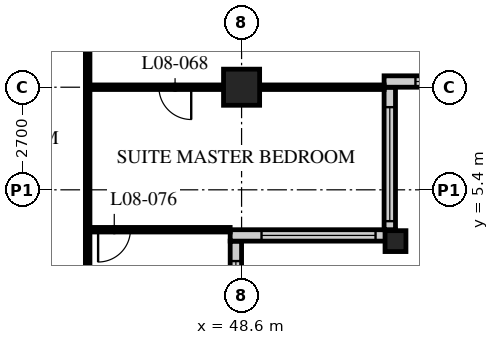
"""IFC4 building model, lengths in metres.
Left out: names, types, materials, properties, quantities, classifications, styles, units other than length and angle.
Written with IfcOpenShell. Run it as: python <this file> out.ifc"""

import sys

from ifc_helpers import new_model, si_unit, direction, frame, frame_2d, origin, origin_2d, place, context, subcontext, project, spatial, rectangle, hollow_rectangle, extrude, element, fill, save


model = new_model("IFC4")
c1 = context("Model", 3, precision=1e-05, world=origin(), true_north=direction((0.0, 1.0)))
c2 = subcontext(c1, "Body", "Model", "MODEL_VIEW")
j1 = project(units=[si_unit("LENGTHUNIT", "METRE"), si_unit("PLANEANGLEUNIT", "RADIAN")], contexts=[c1])
p1 = place(None, origin())
s1 = spatial("IfcSite", under=j1, at=p1, CompositionType="ELEMENT")
p2 = place(p1, origin())
s2 = spatial("IfcBuilding", under=s1, at=p2, CompositionType="ELEMENT")
p3 = place(p2, frame((0.0, 0.0, 39.8)))
s3 = spatial("IfcBuildingStorey", under=s2, at=p3, CompositionType="ELEMENT", Elevation=39.8)
p4 = place(p3, frame((48.6, 8.1, 0.0), z_axis=(0.0, 0.0, 1.0), x_axis=(1.0, 0.0, 0.0)))
e1 = element("IfcColumn", 1, at=p4, inside=s3, PredefinedType="COLUMN", context=c2, shape_type="SweptSolid", body=[
    extrude(hollow_rectangle(XDim=0.95, YDim=0.95, WallThickness=0.095, at=origin_2d()), origin(), (0.0, 0.0, 1.0), 3.4),
])
p5 = place(p3, frame((52.65, 4.05, 0.0), z_axis=(0.0, 0.0, 1.0), x_axis=(1.0, 0.0, 0.0)))
e2 = element("IfcColumn", 2, at=p5, inside=s3, PredefinedType="COLUMN", context=c2, shape_type="SweptSolid", body=[
    extrude(hollow_rectangle(XDim=0.55, YDim=0.55, WallThickness=0.05, at=origin_2d()), origin(), (0.0, 0.0, 1.0), 3.4),
])
p6 = place(p3, frame((48.45, 0.3, 0.0), z_axis=(0.0, 0.0, 1.0), x_axis=(0.0, 1.0, 0.0)))
e3 = element("IfcWall", 3, at=p6, inside=s3, PredefinedType="SOLIDWALL", context=c2, shape_type="SweptSolid", body=[
    extrude(rectangle(XDim=3.75, YDim=0.3, at=frame_2d((1.875, 0.0))), origin(), (0.0, 0.0, 1.0), 3.19),
])
p7 = place(p6, frame((0.225, 0.0, 0.9)))
e4 = element("IfcOpeningElement", 4, at=p7, cuts=e3, PredefinedType="OPENING", context=c2, shape_type="SweptSolid", body=[
    extrude(rectangle(XDim=3.0, YDim=1.5, at=frame_2d((1.5, 0.75))), frame((0.0, 0.16, 0.0), z_axis=(0.0, -1.0, 0.0), x_axis=(1.0, 0.0, 0.0)), (0.0, 0.0, 1.0), 0.32),
])
p8 = place(p3, frame((48.3, 4.2, 0.0), z_axis=(0.0, 0.0, 1.0), x_axis=(1.0, 0.0, 0.0)))
e5 = element("IfcWall", 5, at=p8, inside=s3, PredefinedType="SOLIDWALL", context=c2, shape_type="SweptSolid", body=[
    extrude(rectangle(XDim=4.35, YDim=0.3, at=frame_2d((2.175, 0.0))), origin(), (0.0, 0.0, 1.0), 3.19),
])
p9 = place(p8, frame((0.825, 0.0, 0.9)))
e6 = element("IfcOpeningElement", 6, at=p9, cuts=e5, PredefinedType="OPENING", context=c2, shape_type="SweptSolid", body=[
    extrude(rectangle(XDim=3.0, YDim=1.5, at=frame_2d((1.5, 0.75))), frame((0.0, 0.16, 0.0), z_axis=(0.0, -1.0, 0.0), x_axis=(1.0, 0.0, 0.0)), (0.0, 0.0, 1.0), 0.32),
])
p10 = place(p3, frame((52.5, 4.35, 0.0), z_axis=(0.0, 0.0, 1.0), x_axis=(0.0, 1.0, 0.0)))
e7 = element("IfcWall", 7, at=p10, inside=s3, PredefinedType="SOLIDWALL", context=c2, shape_type="SweptSolid", body=[
    extrude(rectangle(XDim=3.75, YDim=0.3, at=frame_2d((1.875, 0.0))), origin(), (0.0, 0.0, 1.0), 3.19),
])
p11 = place(p10, frame((0.225, 0.0, 0.9)))
e8 = element("IfcOpeningElement", 8, at=p11, cuts=e7, PredefinedType="OPENING", context=c2, shape_type="SweptSolid", body=[
    extrude(rectangle(XDim=3.0, YDim=1.5, at=frame_2d((1.5, 0.75))), frame((0.0, 0.16, 0.0), z_axis=(0.0, -1.0, 0.0), x_axis=(1.0, 0.0, 0.0)), (0.0, 0.0, 1.0), 0.32),
])
p12 = place(p3, frame((52.35, 8.25, 0.0), z_axis=(0.0, 0.0, 1.0), x_axis=(1.0, 0.0, 0.0)))
e9 = element("IfcWall", 9, at=p12, inside=s3, PredefinedType="SOLIDWALL", context=c2, shape_type="SweptSolid", body=[
    extrude(rectangle(XDim=4.35, YDim=0.3, at=frame_2d((2.175, 0.0))), origin(), (0.0, 0.0, 1.0), 3.19),
])
p13 = place(p12, frame((0.825, 0.0, 0.9)))
e10 = element("IfcOpeningElement", 10, at=p13, cuts=e9, PredefinedType="OPENING", context=c2, shape_type="SweptSolid", body=[
    extrude(rectangle(XDim=3.0, YDim=1.5, at=frame_2d((1.5, 0.75))), frame((0.0, 0.16, 0.0), z_axis=(0.0, -1.0, 0.0), x_axis=(1.0, 0.0, 0.0)), (0.0, 0.0, 1.0), 0.32),
])
p14 = place(p3, frame((44.55, 13.8, 0.0), z_axis=(0.0, 0.0, 1.0), x_axis=(0.0, -1.0, 0.0)))
e11 = element("IfcWall", 11, at=p14, inside=s3, PredefinedType="PARTITIONING", context=c2, shape_type="SweptSolid", body=[
    extrude(rectangle(XDim=13.5, YDim=0.12, at=frame_2d((6.75, 0.0))), origin(), (0.0, 0.0, 1.0), 3.19),
])
p15 = place(p3, frame((44.55, 8.1, 0.0), z_axis=(0.0, 0.0, 1.0), x_axis=(1.0, 0.0, 0.0)))
e12 = element("IfcWall", 12, at=p15, inside=s3, PredefinedType="PARTITIONING", context=c2, shape_type="SweptSolid", body=[
    extrude(rectangle(XDim=7.8, YDim=0.12, at=frame_2d((3.9, 0.0))), origin(), (0.0, 0.0, 1.0), 2.578),
])
p16 = place(p15, frame((1.875, 0.0, 0.0)))
e13 = element("IfcOpeningElement", 13, at=p16, cuts=e12, PredefinedType="OPENING", context=c2, shape_type="SweptSolid", body=[
    extrude(rectangle(XDim=0.85, YDim=2.1, at=frame_2d((0.425, 1.05))), frame((0.0, 0.07, 0.0), z_axis=(0.0, -1.0, 0.0), x_axis=(1.0, 0.0, 0.0)), (0.0, 0.0, 1.0), 0.14),
])
p17 = place(p3, frame((44.55, 4.35, 0.0), z_axis=(0.0, 0.0, 1.0), x_axis=(1.0, 0.0, 0.0)))
e14 = element("IfcWall", 14, at=p17, inside=s3, PredefinedType="PARTITIONING", context=c2, shape_type="SweptSolid", body=[
    extrude(rectangle(XDim=3.75, YDim=0.12, at=frame_2d((1.875, 0.0))), origin(), (0.0, 0.0, 1.0), 3.19),
])
p18 = place(p17, frame((0.275, 0.0, 0.0)))
e15 = element("IfcOpeningElement", 15, at=p18, cuts=e14, PredefinedType="OPENING", context=c2, shape_type="SweptSolid", body=[
    extrude(rectangle(XDim=0.85, YDim=2.1, at=frame_2d((0.425, 1.05))), frame((0.0, 0.07, 0.0), z_axis=(0.0, -1.0, 0.0), x_axis=(1.0, 0.0, 0.0)), (0.0, 0.0, 1.0), 0.14),
])
p19 = place(p7, origin())
e16 = element("IfcWindow", 16, at=p19, inside=s3, PartitioningType="SINGLE_PANEL", PredefinedType="WINDOW", context=c2, shape_type="SweptSolid", body=[
    extrude(rectangle(XDim=3.0, YDim=1.5, at=frame_2d((1.5, 0.75))), frame((0.0, 0.03, 0.0), z_axis=(0.0, -1.0, 0.0), x_axis=(1.0, 0.0, 0.0)), (0.0, 0.0, 1.0), 0.06),
])
fill(e4, e16)
p20 = place(p9, origin())
e17 = element("IfcWindow", 17, at=p20, inside=s3, PartitioningType="SINGLE_PANEL", PredefinedType="WINDOW", context=c2, shape_type="SweptSolid", body=[
    extrude(rectangle(XDim=3.0, YDim=1.5, at=frame_2d((1.5, 0.75))), frame((0.0, 0.03, 0.0), z_axis=(0.0, -1.0, 0.0), x_axis=(1.0, 0.0, 0.0)), (0.0, 0.0, 1.0), 0.06),
])
fill(e6, e17)
p21 = place(p11, origin())
e18 = element("IfcWindow", 18, at=p21, inside=s3, PartitioningType="SINGLE_PANEL", PredefinedType="WINDOW", context=c2, shape_type="SweptSolid", body=[
    extrude(rectangle(XDim=3.0, YDim=1.5, at=frame_2d((1.5, 0.75))), frame((0.0, 0.03, 0.0), z_axis=(0.0, -1.0, 0.0), x_axis=(1.0, 0.0, 0.0)), (0.0, 0.0, 1.0), 0.06),
])
fill(e8, e18)
p22 = place(p13, origin())
e19 = element("IfcWindow", 19, at=p22, inside=s3, PartitioningType="SINGLE_PANEL", PredefinedType="WINDOW", context=c2, shape_type="SweptSolid", body=[
    extrude(rectangle(XDim=3.0, YDim=1.5, at=frame_2d((1.5, 0.75))), frame((0.0, 0.03, 0.0), z_axis=(0.0, -1.0, 0.0), x_axis=(1.0, 0.0, 0.0)), (0.0, 0.0, 1.0), 0.06),
])
fill(e10, e19)
p23 = place(p16, origin())
e20 = element("IfcDoor", 20, at=p23, inside=s3, OperationType="SINGLE_SWING_LEFT", PredefinedType="DOOR", context=c2, shape_type="SweptSolid", body=[
    extrude(rectangle(XDim=0.85, YDim=2.1, at=frame_2d((0.425, 1.05))), frame((0.0, 0.025, 0.0), z_axis=(0.0, -1.0, 0.0), x_axis=(1.0, 0.0, 0.0)), (0.0, 0.0, 1.0), 0.05),
])
fill(e13, e20)
p24 = place(p18, origin())
e21 = element("IfcDoor", 21, at=p24, inside=s3, OperationType="SINGLE_SWING_RIGHT", PredefinedType="DOOR", context=c2, shape_type="SweptSolid", body=[
    extrude(rectangle(XDim=0.85, YDim=2.1, at=frame_2d((0.425, 1.05))), frame((0.0, 0.025, 0.0), z_axis=(0.0, -1.0, 0.0), x_axis=(1.0, 0.0, 0.0)), (0.0, 0.0, 1.0), 0.05),
])
fill(e15, e21)
save(model, sys.argv[1])
